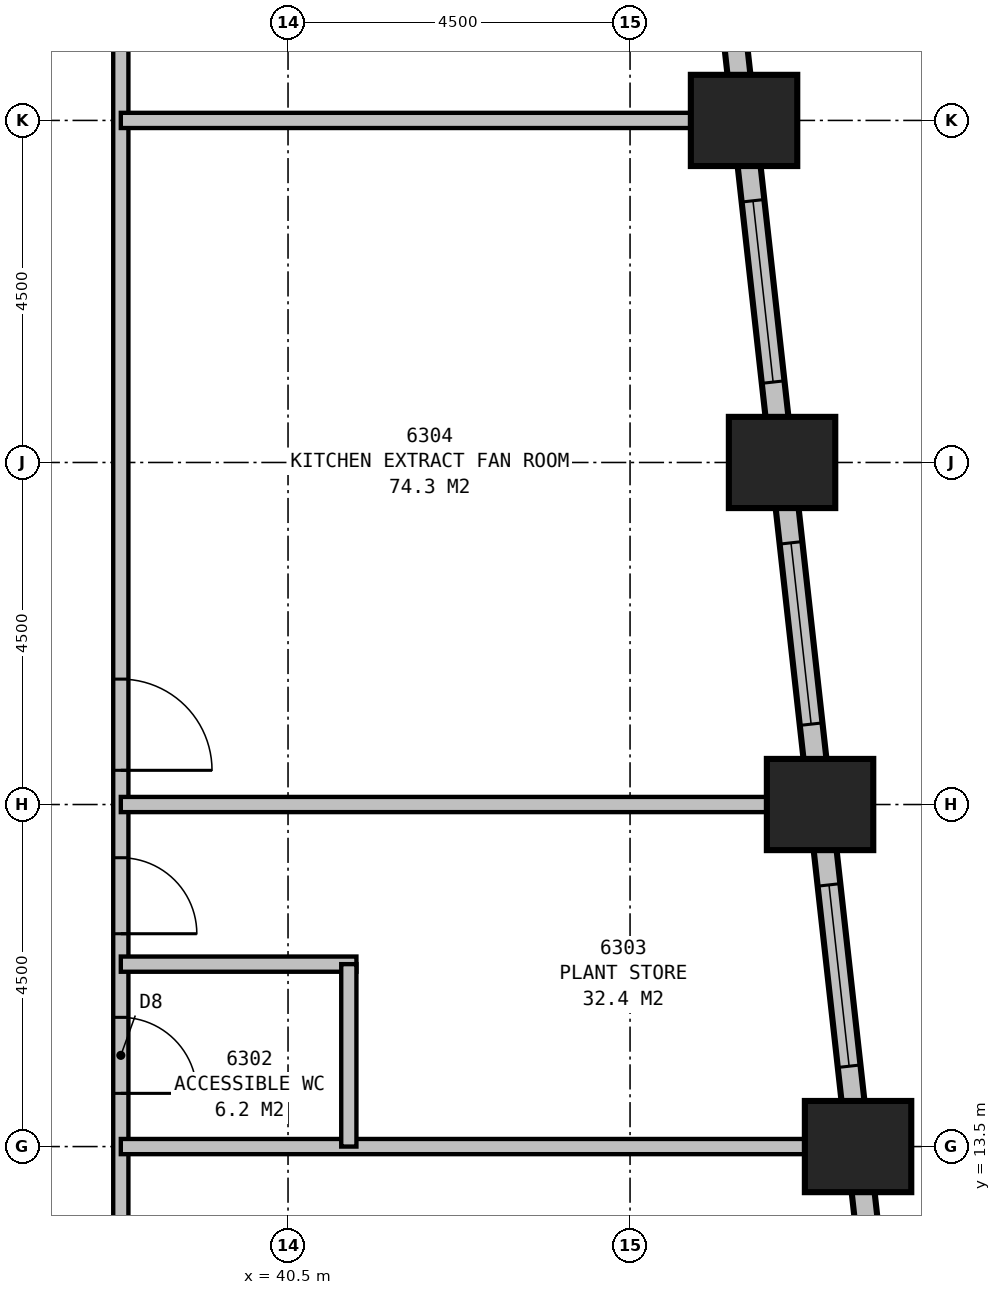
"""IFC4 building model, lengths in metres.
Left out: names, types, materials, properties, quantities, classifications, styles, units other than length and angle.
Written with IfcOpenShell. Run it as: python <this file> out.ifc"""

import sys

from ifc_helpers import new_model, si_unit, direction, frame, frame_2d, origin, origin_2d, place, context, subcontext, project, spatial, rectangle, extrude, element, fill, save


model = new_model("IFC4")
c1 = context("Model", 3, precision=1e-05, world=origin(), true_north=direction((0.0, 1.0)))
c2 = subcontext(c1, "Body", "Model", "MODEL_VIEW")
j1 = project(units=[si_unit("LENGTHUNIT", "METRE"), si_unit("PLANEANGLEUNIT", "RADIAN")], contexts=[c1])
p1 = place(None, origin())
s1 = spatial("IfcSite", under=j1, at=p1, CompositionType="ELEMENT")
p2 = place(p1, origin())
s2 = spatial("IfcBuilding", under=s1, at=p2, CompositionType="ELEMENT")
p3 = place(p2, frame((0.0, 0.0, 244.7)))
s3 = spatial("IfcBuildingStorey", under=s2, at=p3, CompositionType="ELEMENT", Elevation=244.7)
for number, where, z_axis, x_axis in (
    (1, (48.0, 13.5, 0.0), (0.0, 0.0, 1.0), (1.0, 0.0, 0.0)),
    (2, (47.5, 18.0, 0.0), (0.0, 0.0, 1.0), (1.0, 0.0, 0.0)),
    (3, (47.0, 22.5, 0.0), (0.0, 0.0, 1.0), (1.0, 0.0, 0.0)),
    (4, (46.5, 27.0, 0.0), (0.0, 0.0, 1.0), (1.0, 0.0, 0.0)),
):
    element("IfcColumn", number, at=place(p3, frame(where, z_axis=z_axis, x_axis=x_axis)), inside=s3, PredefinedType="COLUMN", context=c2, shape_type="SweptSolid", body=[
        extrude(rectangle(XDim=1.4, YDim=1.2, at=origin_2d()), origin(), (0.0, 0.0, 1.0), 6.0),
    ])
p4 = place(p3, frame((49.017, 4.351, 0.0), z_axis=(0.0, 0.0, 1.0), x_axis=(-0.110433201132, 0.993883548555, 0.0)))
e5 = element("IfcWall", 5, at=p4, inside=s3, PredefinedType="STANDARD", context=c2, shape_type="SweptSolid", body=[
    extrude(rectangle(XDim=31.994, YDim=0.3, at=frame_2d((15.997, 0.0))), origin(), (0.0, 0.0, 1.0), 4.45),
])
p5 = place(p4, frame((1.214, 0.0, 0.5)))
e6 = element("IfcOpeningElement", 6, at=p5, cuts=e5, PredefinedType="OPENING", context=c2, shape_type="SweptSolid", body=[
    extrude(rectangle(XDim=2.4, YDim=2.0, at=frame_2d((1.2, 1.0))), frame((0.0, 0.16, 0.0), z_axis=(0.0, -1.0, 0.0), x_axis=(1.0, 0.0, 0.0)), (0.0, 0.0, 1.0), 0.32),
])
p6 = place(p4, frame((5.742, 0.0, 0.5)))
e7 = element("IfcOpeningElement", 7, at=p6, cuts=e5, PredefinedType="OPENING", context=c2, shape_type="SweptSolid", body=[
    extrude(rectangle(XDim=2.4, YDim=2.0, at=frame_2d((1.2, 1.0))), frame((0.0, 0.16, 0.0), z_axis=(0.0, -1.0, 0.0), x_axis=(1.0, 0.0, 0.0)), (0.0, 0.0, 1.0), 0.32),
])
p7 = place(p4, frame((10.269, 0.0, 0.5)))
e8 = element("IfcOpeningElement", 8, at=p7, cuts=e5, PredefinedType="OPENING", context=c2, shape_type="SweptSolid", body=[
    extrude(rectangle(XDim=2.4, YDim=2.0, at=frame_2d((1.2, 1.0))), frame((0.0, 0.16, 0.0), z_axis=(0.0, -1.0, 0.0), x_axis=(1.0, 0.0, 0.0)), (0.0, 0.0, 1.0), 0.32),
])
p8 = place(p4, frame((14.797, 0.0, 0.5)))
e9 = element("IfcOpeningElement", 9, at=p8, cuts=e5, PredefinedType="OPENING", context=c2, shape_type="SweptSolid", body=[
    extrude(rectangle(XDim=2.4, YDim=2.0, at=frame_2d((1.2, 1.0))), frame((0.0, 0.16, 0.0), z_axis=(0.0, -1.0, 0.0), x_axis=(1.0, 0.0, 0.0)), (0.0, 0.0, 1.0), 0.32),
])
p9 = place(p4, frame((19.325, 0.0, 0.5)))
e10 = element("IfcOpeningElement", 10, at=p9, cuts=e5, PredefinedType="OPENING", context=c2, shape_type="SweptSolid", body=[
    extrude(rectangle(XDim=2.4, YDim=2.0, at=frame_2d((1.2, 1.0))), frame((0.0, 0.16, 0.0), z_axis=(0.0, -1.0, 0.0), x_axis=(1.0, 0.0, 0.0)), (0.0, 0.0, 1.0), 0.32),
])
p10 = place(p4, frame((23.852, 0.0, 0.5)))
e11 = element("IfcOpeningElement", 11, at=p10, cuts=e5, PredefinedType="OPENING", context=c2, shape_type="SweptSolid", body=[
    extrude(rectangle(XDim=2.4, YDim=2.0, at=frame_2d((1.2, 1.0))), frame((0.0, 0.16, 0.0), z_axis=(0.0, -1.0, 0.0), x_axis=(1.0, 0.0, 0.0)), (0.0, 0.0, 1.0), 0.32),
])
p11 = place(p4, frame((28.38, 0.0, 0.5)))
e12 = element("IfcOpeningElement", 12, at=p11, cuts=e5, PredefinedType="OPENING", context=c2, shape_type="SweptSolid", body=[
    extrude(rectangle(XDim=2.4, YDim=2.0, at=frame_2d((1.2, 1.0))), frame((0.0, 0.16, 0.0), z_axis=(0.0, -1.0, 0.0), x_axis=(1.0, 0.0, 0.0)), (0.0, 0.0, 1.0), 0.32),
])
p12 = place(p3, frame((38.3, 11.2, 0.0), z_axis=(0.0, 0.0, 1.0), x_axis=(0.0, 1.0, 0.0)))
e13 = element("IfcWall", 13, at=p12, inside=s3, PredefinedType="PARTITIONING", context=c2, shape_type="SweptSolid", body=[
    extrude(rectangle(XDim=18.1, YDim=0.2, at=frame_2d((9.05, 0.0))), origin(), (0.0, 0.0, 1.0), 5.75),
])
p13 = place(p12, frame((4.0, 0.0, 0.0), z_axis=(0.0, 0.0, 1.0), x_axis=(-1.0, 0.0, 0.0)))
e14 = element("IfcOpeningElement", 14, at=p13, cuts=e13, PredefinedType="OPENING", context=c2, shape_type="SweptSolid", body=[
    extrude(rectangle(XDim=1.0, YDim=2.1, at=frame_2d((0.5, 1.05))), frame((0.0, 0.11, 0.0), z_axis=(0.0, -1.0, 0.0), x_axis=(1.0, 0.0, 0.0)), (0.0, 0.0, 1.0), 0.22),
])
p14 = place(p12, frame((6.1, 0.0, 0.0), z_axis=(0.0, 0.0, 1.0), x_axis=(-1.0, 0.0, 0.0)))
e15 = element("IfcOpeningElement", 15, at=p14, cuts=e13, PredefinedType="OPENING", context=c2, shape_type="SweptSolid", body=[
    extrude(rectangle(XDim=1.0, YDim=2.1, at=frame_2d((0.5, 1.05))), frame((0.0, 0.11, 0.0), z_axis=(0.0, -1.0, 0.0), x_axis=(1.0, 0.0, 0.0)), (0.0, 0.0, 1.0), 0.22),
])
p15 = place(p12, frame((8.45, 0.0, 0.0), z_axis=(0.0, 0.0, 1.0), x_axis=(-1.0, 0.0, 0.0)))
e16 = element("IfcOpeningElement", 16, at=p15, cuts=e13, PredefinedType="OPENING", context=c2, shape_type="SweptSolid", body=[
    extrude(rectangle(XDim=1.2, YDim=2.1, at=frame_2d((0.6, 1.05))), frame((0.0, 0.11, 0.0), z_axis=(0.0, -1.0, 0.0), x_axis=(1.0, 0.0, 0.0)), (0.0, 0.0, 1.0), 0.22),
])
p16 = place(p3, frame((38.3, 13.5, 0.0), z_axis=(0.0, 0.0, 1.0), x_axis=(1.0, 0.0, 0.0)))
e17 = element("IfcWall", 17, at=p16, inside=s3, PredefinedType="PARTITIONING", context=c2, shape_type="SweptSolid", body=[
    extrude(rectangle(XDim=8.999, YDim=0.2, at=frame_2d((4.5, 0.0))), origin(), (0.0, 0.0, 1.0), 4.45),
])
p17 = place(p3, frame((38.3, 18.0, 0.0), z_axis=(0.0, 0.0, 1.0), x_axis=(1.0, 0.0, 0.0)))
e18 = element("IfcWall", 18, at=p17, inside=s3, PredefinedType="PARTITIONING", context=c2, shape_type="SweptSolid", body=[
    extrude(rectangle(XDim=8.499, YDim=0.2, at=frame_2d((4.25, 0.0))), origin(), (0.0, 0.0, 1.0), 4.85),
])
p18 = place(p3, frame((38.3, 27.0, 0.0), z_axis=(0.0, 0.0, 1.0), x_axis=(1.0, 0.0, 0.0)))
e19 = element("IfcWall", 19, at=p18, inside=s3, PredefinedType="PARTITIONING", context=c2, shape_type="SweptSolid", body=[
    extrude(rectangle(XDim=7.499, YDim=0.2, at=frame_2d((3.75, 0.0))), origin(), (0.0, 0.0, 1.0), 4.45),
])
p19 = place(p3, frame((38.3, 15.9, 0.0), z_axis=(0.0, 0.0, 1.0), x_axis=(1.0, 0.0, 0.0)))
e20 = element("IfcWall", 20, at=p19, inside=s3, PredefinedType="PARTITIONING", context=c2, shape_type="SweptSolid", body=[
    extrude(rectangle(XDim=3.1, YDim=0.2, at=frame_2d((1.55, 0.0))), origin(), (0.0, 0.0, 1.0), 5.75),
])
p20 = place(p3, frame((41.3, 13.5, 0.0), z_axis=(0.0, 0.0, 1.0), x_axis=(0.0, 1.0, 0.0)))
e21 = element("IfcWall", 21, at=p20, inside=s3, PredefinedType="PARTITIONING", context=c2, shape_type="SweptSolid", body=[
    extrude(rectangle(XDim=2.4, YDim=0.2, at=frame_2d((1.2, 0.0))), origin(), (0.0, 0.0, 1.0), 5.75),
])
p21 = place(p7, origin())
e22 = element("IfcWindow", 22, at=p21, inside=s3, PartitioningType="SINGLE_PANEL", PredefinedType="USERDEFINED", context=c2, shape_type="SweptSolid", body=[
    extrude(rectangle(XDim=2.4, YDim=2.0, at=frame_2d((1.2, 1.0))), frame((0.0, 0.03, 0.0), z_axis=(0.0, -1.0, 0.0), x_axis=(1.0, 0.0, 0.0)), (0.0, 0.0, 1.0), 0.06),
])
fill(e8, e22)
p22 = place(p8, origin())
e23 = element("IfcWindow", 23, at=p22, inside=s3, PartitioningType="SINGLE_PANEL", PredefinedType="USERDEFINED", context=c2, shape_type="SweptSolid", body=[
    extrude(rectangle(XDim=2.4, YDim=2.0, at=frame_2d((1.2, 1.0))), frame((0.0, 0.03, 0.0), z_axis=(0.0, -1.0, 0.0), x_axis=(1.0, 0.0, 0.0)), (0.0, 0.0, 1.0), 0.06),
])
fill(e9, e23)
p23 = place(p9, origin())
e24 = element("IfcWindow", 24, at=p23, inside=s3, PartitioningType="SINGLE_PANEL", PredefinedType="USERDEFINED", context=c2, shape_type="SweptSolid", body=[
    extrude(rectangle(XDim=2.4, YDim=2.0, at=frame_2d((1.2, 1.0))), frame((0.0, 0.03, 0.0), z_axis=(0.0, -1.0, 0.0), x_axis=(1.0, 0.0, 0.0)), (0.0, 0.0, 1.0), 0.06),
])
fill(e10, e24)
p24 = place(p13, origin())
e25 = element("IfcDoor", 25, at=p24, inside=s3, OperationType="SINGLE_SWING_RIGHT", PredefinedType="DOOR", context=c2, shape_type="SweptSolid", body=[
    extrude(rectangle(XDim=1.0, YDim=2.1, at=frame_2d((0.5, 1.05))), frame((0.0, 0.025, 0.0), z_axis=(0.0, -1.0, 0.0), x_axis=(1.0, 0.0, 0.0)), (0.0, 0.0, 1.0), 0.05),
])
fill(e14, e25)
p25 = place(p14, origin())
e26 = element("IfcDoor", 26, at=p25, inside=s3, OperationType="SINGLE_SWING_RIGHT", PredefinedType="DOOR", context=c2, shape_type="SweptSolid", body=[
    extrude(rectangle(XDim=1.0, YDim=2.1, at=frame_2d((0.5, 1.05))), frame((0.0, 0.025, 0.0), z_axis=(0.0, -1.0, 0.0), x_axis=(1.0, 0.0, 0.0)), (0.0, 0.0, 1.0), 0.05),
])
fill(e15, e26)
p26 = place(p15, origin())
e27 = element("IfcDoor", 27, at=p26, inside=s3, OperationType="SINGLE_SWING_RIGHT", PredefinedType="DOOR", context=c2, shape_type="SweptSolid", body=[
    extrude(rectangle(XDim=1.2, YDim=2.1, at=frame_2d((0.6, 1.05))), frame((0.0, 0.025, 0.0), z_axis=(0.0, -1.0, 0.0), x_axis=(1.0, 0.0, 0.0)), (0.0, 0.0, 1.0), 0.05),
])
fill(e16, e27)
save(model, sys.argv[1])
